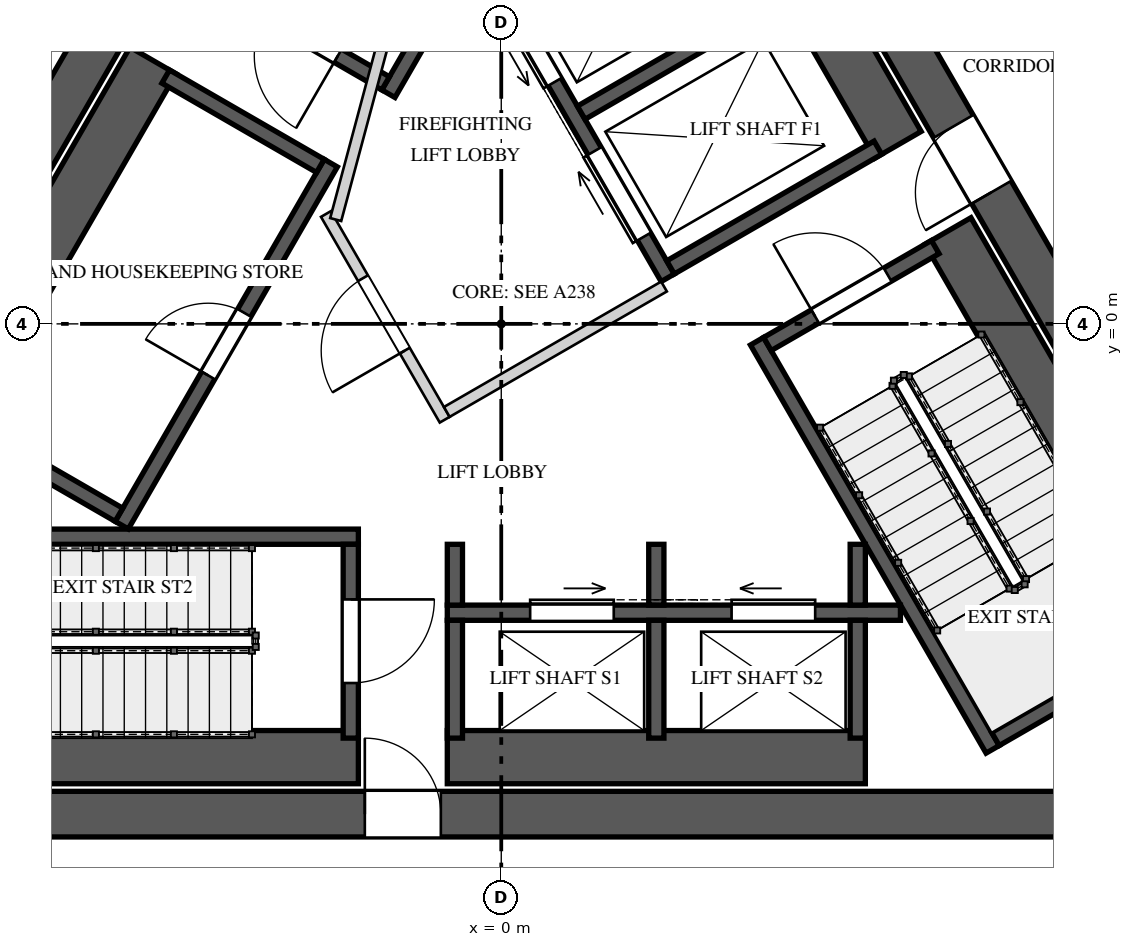
"""IFC4 building model, lengths in metres.
Left out: names, types, materials, properties, quantities, classifications, styles, units other than length and angle.
Written with IfcOpenShell. Run it as: python <this file> out.ifc"""

import sys

from ifc_helpers import new_model, si_unit, direction, frame, frame_2d, origin, place, context, subcontext, project, spatial, rectangle, extrude, element, fill, save


model = new_model("IFC4")
c1 = context("Model", 3, precision=1e-05, world=origin(), true_north=direction((0.0, 1.0)))
c2 = subcontext(c1, "Body", "Model", "MODEL_VIEW")
j1 = project(units=[si_unit("LENGTHUNIT", "METRE"), si_unit("PLANEANGLEUNIT", "RADIAN")], contexts=[c1])
p1 = place(None, origin())
s1 = spatial("IfcSite", under=j1, at=p1, CompositionType="ELEMENT")
p2 = place(p1, origin())
s2 = spatial("IfcBuilding", under=s1, at=p2, CompositionType="ELEMENT")
p3 = place(p2, frame((0.0, 0.0, 274.4)))
s3 = spatial("IfcBuildingStorey", under=s2, at=p3, CompositionType="ELEMENT", Elevation=274.4)
p4 = place(p3, frame((-1.27, 10.7, 0.0), z_axis=(0.0, 0.0, 1.0), x_axis=(-0.499999536116, -0.866025671608, 0.0)))
e1 = element("IfcWall", 1, at=p4, inside=s3, PredefinedType="SHEAR", context=c2, shape_type="SweptSolid", body=[
    extrude(rectangle(XDim=17.263, YDim=0.6, at=frame_2d((8.631, 0.0))), origin(), (0.0, 0.0, 1.0), 4.0),
])
p5 = place(p4, frame((6.836, 0.0, 0.0)))
e2 = element("IfcOpeningElement", 2, at=p5, cuts=e1, PredefinedType="OPENING", context=c2, shape_type="SweptSolid", body=[
    extrude(rectangle(XDim=1.0, YDim=2.4, at=frame_2d((0.5, 1.2))), frame((0.0, 0.31, 0.0), z_axis=(0.0, -1.0, 0.0), x_axis=(1.0, 0.0, 0.0)), (0.0, 0.0, 1.0), 0.62),
])
p6 = place(p4, frame((15.034, 0.0, 0.0)))
e3 = element("IfcOpeningElement", 3, at=p6, cuts=e1, PredefinedType="OPENING", context=c2, shape_type="SweptSolid", body=[
    extrude(rectangle(XDim=0.8, YDim=2.1, at=frame_2d((0.4, 1.05))), frame((0.0, 0.31, 0.0), z_axis=(0.0, -1.0, 0.0), x_axis=(1.0, 0.0, 0.0)), (0.0, 0.0, 1.0), 0.62),
])
p7 = place(p3, frame((-8.631, -6.45, 0.0), z_axis=(0.0, 0.0, 1.0), x_axis=(1.0, 0.0, 0.0)))
e4 = element("IfcWall", 4, at=p7, inside=s3, PredefinedType="SHEAR", context=c2, shape_type="SweptSolid", body=[
    extrude(rectangle(XDim=17.263, YDim=0.6, at=frame_2d((8.631, 0.0))), origin(), (0.0, 0.0, 1.0), 4.0),
])
p8 = place(p7, frame((6.836, 0.0, 0.0)))
e5 = element("IfcOpeningElement", 5, at=p8, cuts=e4, PredefinedType="OPENING", context=c2, shape_type="SweptSolid", body=[
    extrude(rectangle(XDim=1.0, YDim=2.4, at=frame_2d((0.5, 1.2))), frame((0.0, 0.31, 0.0), z_axis=(0.0, -1.0, 0.0), x_axis=(1.0, 0.0, 0.0)), (0.0, 0.0, 1.0), 0.62),
])
p9 = place(p3, frame((9.902, -4.25, 0.0), z_axis=(0.0, 0.0, 1.0), x_axis=(-0.499999536116, 0.866025671608, 0.0)))
e6 = element("IfcWall", 6, at=p9, inside=s3, PredefinedType="SHEAR", context=c2, shape_type="SweptSolid", body=[
    extrude(rectangle(XDim=17.263, YDim=0.6, at=frame_2d((8.631, 0.0))), origin(), (0.0, 0.0, 1.0), 4.0),
])
p10 = place(p9, frame((6.906, 0.0, 0.0)))
e7 = element("IfcOpeningElement", 7, at=p10, cuts=e6, PredefinedType="OPENING", context=c2, shape_type="SweptSolid", body=[
    extrude(rectangle(XDim=1.0, YDim=2.4, at=frame_2d((0.5, 1.2))), frame((0.0, 0.31, 0.0), z_axis=(0.0, -1.0, 0.0), x_axis=(1.0, 0.0, 0.0)), (0.0, 0.0, 1.0), 0.62),
])
p11 = place(p3, frame((1.615, 8.397, 0.0), z_axis=(0.0, 0.0, 1.0), x_axis=(-0.500009909098, -0.866019682689, 0.0)))
e8 = element("IfcWall", 8, at=p11, inside=s3, PredefinedType="SOLIDWALL", context=c2, shape_type="SweptSolid", body=[
    extrude(rectangle(XDim=6.2, YDim=0.2, at=frame_2d((3.1, 0.0))), origin(), (0.0, 0.0, 1.0), 3.65),
])
p12 = place(p3, frame((-1.521, 3.165, 0.0), z_axis=(0.0, 0.0, 1.0), x_axis=(-0.866030925526, 0.499990435942, 0.0)))
e9 = element("IfcWall", 9, at=p12, inside=s3, PredefinedType="SOLIDWALL", context=c2, shape_type="SweptSolid", body=[
    extrude(rectangle(XDim=2.55, YDim=0.2, at=frame_2d((1.275, 0.0))), origin(), (0.0, 0.0, 1.0), 3.65),
])
p13 = place(p12, frame((0.725, 0.0, 0.0)))
e10 = element("IfcOpeningElement", 10, at=p13, cuts=e9, PredefinedType="OPENING", context=c2, shape_type="SweptSolid", body=[
    extrude(rectangle(XDim=1.1, YDim=2.4, at=frame_2d((0.55, 1.2))), frame((0.0, 0.11, 0.0), z_axis=(0.0, -1.0, 0.0), x_axis=(1.0, 0.0, 0.0)), (0.0, 0.0, 1.0), 0.22),
])
p14 = place(p3, frame((-8.08, -5.7, 0.0), z_axis=(0.0, 0.0, 1.0), x_axis=(1.0, 0.0, 0.0)))
e11 = element("IfcWall", 11, at=p14, inside=s3, PredefinedType="SOLIDWALL", context=c2, shape_type="SweptSolid", body=[
    extrude(rectangle(XDim=6.2, YDim=0.7, at=frame_2d((3.1, 0.0))), origin(), (0.0, 0.0, 1.0), 3.65),
])
p15 = place(p3, frame((-8.08, -2.8, 0.0), z_axis=(0.0, 0.0, 1.0), x_axis=(1.0, 0.0, 0.0)))
e12 = element("IfcWall", 12, at=p15, inside=s3, PredefinedType="SOLIDWALL", context=c2, shape_type="SweptSolid", body=[
    extrude(rectangle(XDim=6.2, YDim=0.2, at=frame_2d((3.1, 0.0))), origin(), (0.0, 0.0, 1.0), 3.65),
])
p16 = place(p3, frame((-1.98, -2.9, 0.0), z_axis=(0.0, 0.0, 1.0), x_axis=(0.0, -1.0, 0.0)))
e13 = element("IfcWall", 13, at=p16, inside=s3, PredefinedType="SOLIDWALL", context=c2, shape_type="SweptSolid", body=[
    extrude(rectangle(XDim=2.55, YDim=0.2, at=frame_2d((1.275, 0.0))), origin(), (0.0, 0.0, 1.0), 3.65),
])
p17 = place(p16, frame((0.725, 0.0, 0.0)))
e14 = element("IfcOpeningElement", 14, at=p17, cuts=e13, PredefinedType="OPENING", context=c2, shape_type="SweptSolid", body=[
    extrude(rectangle(XDim=1.1, YDim=2.4, at=frame_2d((0.55, 1.2))), frame((0.0, 0.11, 0.0), z_axis=(0.0, -1.0, 0.0), x_axis=(1.0, 0.0, 0.0)), (0.0, 0.0, 1.0), 0.22),
])
p18 = place(p3, frame((8.976, -4.147, 0.0), z_axis=(0.0, 0.0, 1.0), x_axis=(-0.49998037582, 0.866036733513, 0.0)))
e15 = element("IfcWall", 15, at=p18, inside=s3, PredefinedType="SOLIDWALL", context=c2, shape_type="SweptSolid", body=[
    extrude(rectangle(XDim=6.2, YDim=0.7, at=frame_2d((3.1, 0.0))), origin(), (0.0, 0.0, 1.0), 3.65),
])
p19 = place(p3, frame((6.465, -5.597, 0.0), z_axis=(0.0, 0.0, 1.0), x_axis=(-0.49998037582, 0.866036733513, 0.0)))
e16 = element("IfcWall", 16, at=p19, inside=s3, PredefinedType="SOLIDWALL", context=c2, shape_type="SweptSolid", body=[
    extrude(rectangle(XDim=6.2, YDim=0.2, at=frame_2d((3.1, 0.0))), origin(), (0.0, 0.0, 1.0), 3.65),
])
p20 = place(p3, frame((6.501, -5.461, 0.0), z_axis=(0.0, 0.0, 1.0), x_axis=(0.865989465428, 0.500062241894, 0.0)))
e17 = element("IfcWall", 17, at=p20, inside=s3, PredefinedType="SOLIDWALL", context=c2, shape_type="SweptSolid", body=[
    extrude(rectangle(XDim=2.55, YDim=0.2, at=frame_2d((1.275, 0.0))), origin(), (0.0, 0.0, 1.0), 3.65),
])
p21 = place(p3, frame((3.501, -0.265, 0.0), z_axis=(0.0, 0.0, 1.0), x_axis=(0.866030925526, 0.499990435942, 0.0)))
e18 = element("IfcWall", 18, at=p21, inside=s3, PredefinedType="SOLIDWALL", context=c2, shape_type="SweptSolid", body=[
    extrude(rectangle(XDim=2.55, YDim=0.2, at=frame_2d((1.275, 0.0))), origin(), (0.0, 0.0, 1.0), 3.65),
])
p22 = place(p21, frame((0.725, 0.0, 0.0)))
e19 = element("IfcOpeningElement", 19, at=p22, cuts=e18, PredefinedType="OPENING", context=c2, shape_type="SweptSolid", body=[
    extrude(rectangle(XDim=1.1, YDim=2.4, at=frame_2d((0.55, 1.2))), frame((0.0, 0.11, 0.0), z_axis=(0.0, -1.0, 0.0), x_axis=(1.0, 0.0, 0.0)), (0.0, 0.0, 1.0), 0.22),
])
p23 = place(p3, frame((-4.993, -2.648, 0.0), z_axis=(0.0, 0.0, 1.0), x_axis=(0.499996545922, 0.866027397988, 0.0)))
e20 = element("IfcWall", 20, at=p23, inside=s3, PredefinedType="SOLIDWALL", context=c2, shape_type="SweptSolid", body=[
    extrude(rectangle(XDim=5.5, YDim=0.2, at=frame_2d((2.75, 0.0))), origin(), (0.0, 0.0, 1.0), 3.65),
])
p24 = place(p23, frame((2.275, 0.0, 0.0)))
e21 = element("IfcOpeningElement", 21, at=p24, cuts=e20, PredefinedType="OPENING", context=c2, shape_type="SweptSolid", body=[
    extrude(rectangle(XDim=0.95, YDim=2.4, at=frame_2d((0.475, 1.2))), frame((0.0, 0.11, 0.0), z_axis=(0.0, -1.0, 0.0), x_axis=(1.0, 0.0, 0.0)), (0.0, 0.0, 1.0), 0.22),
])
p25 = place(p3, frame((-4.581, 3.465, 0.0), z_axis=(0.0, 0.0, 1.0), x_axis=(-0.499996545922, -0.866027397988, 0.0)))
e22 = element("IfcWall", 22, at=p25, inside=s3, PredefinedType="SOLIDWALL", context=c2, shape_type="SweptSolid", body=[
    extrude(rectangle(XDim=5.5, YDim=0.7, at=frame_2d((2.75, 0.0))), origin(), (0.0, 0.0, 1.0), 3.65),
])
p26 = place(p3, frame((-2.38, 2.078, 0.0), z_axis=(0.0, 0.0, 1.0), x_axis=(-0.866061024631, 0.499938297808, 0.0)))
e23 = element("IfcWall", 23, at=p26, inside=s3, PredefinedType="SOLIDWALL", context=c2, shape_type="SweptSolid", body=[
    extrude(rectangle(XDim=2.35, YDim=0.2, at=frame_2d((1.175, 0.0))), origin(), (0.0, 0.0, 1.0), 3.65),
])
p27 = place(p3, frame((-5.03, -2.512, 0.0), z_axis=(0.0, 0.0, 1.0), x_axis=(-0.866016039709, 0.500016218704, 0.0)))
e24 = element("IfcWall", 24, at=p27, inside=s3, PredefinedType="SOLIDWALL", context=c2, shape_type="SweptSolid", body=[
    extrude(rectangle(XDim=2.35, YDim=0.2, at=frame_2d((1.175, 0.0))), origin(), (0.0, 0.0, 1.0), 3.65),
])
p28 = place(p3, frame((-0.71, -3.8, 0.0), z_axis=(0.0, 0.0, 1.0), x_axis=(1.0, 0.0, 0.0)))
e25 = element("IfcWall", 25, at=p28, inside=s3, PredefinedType="SOLIDWALL", context=c2, shape_type="SweptSolid", body=[
    extrude(rectangle(XDim=5.961, YDim=0.2, at=frame_2d((2.981, 0.0))), origin(), (0.0, 0.0, 1.0), 3.65),
])
p29 = place(p28, frame((1.09, 0.0, 0.0)))
e26 = element("IfcOpeningElement", 26, at=p29, cuts=e25, PredefinedType="OPENING", context=c2, shape_type="SweptSolid", body=[
    extrude(rectangle(XDim=1.1, YDim=2.1, at=frame_2d((0.55, 1.05))), frame((0.0, 0.11, 0.0), z_axis=(0.0, -1.0, 0.0), x_axis=(1.0, 0.0, 0.0)), (0.0, 0.0, 1.0), 0.22),
])
p30 = place(p28, frame((3.74, 0.0, 0.0)))
e27 = element("IfcOpeningElement", 27, at=p30, cuts=e25, PredefinedType="OPENING", context=c2, shape_type="SweptSolid", body=[
    extrude(rectangle(XDim=1.1, YDim=2.1, at=frame_2d((0.55, 1.05))), frame((0.0, 0.11, 0.0), z_axis=(0.0, -1.0, 0.0), x_axis=(1.0, 0.0, 0.0)), (0.0, 0.0, 1.0), 0.22),
])
p31 = place(p3, frame((-0.71, -5.7, 0.0), z_axis=(0.0, 0.0, 1.0), x_axis=(1.0, 0.0, 0.0)))
e28 = element("IfcWall", 28, at=p31, inside=s3, PredefinedType="SOLIDWALL", context=c2, shape_type="SweptSolid", body=[
    extrude(rectangle(XDim=5.5, YDim=0.7, at=frame_2d((2.75, 0.0))), origin(), (0.0, 0.0, 1.0), 3.65),
])
p32 = place(p3, frame((-0.61, -3.9, 0.0), z_axis=(0.0, 0.0, 1.0), x_axis=(0.0, -1.0, 0.0)))
e29 = element("IfcWall", 29, at=p32, inside=s3, PredefinedType="SOLIDWALL", context=c2, shape_type="SweptSolid", body=[
    extrude(rectangle(XDim=1.55, YDim=0.2, at=frame_2d((0.775, 0.0))), origin(), (0.0, 0.0, 1.0), 3.65),
])
p33 = place(p3, frame((-0.61, -2.9, 0.0), z_axis=(0.0, 0.0, 1.0), x_axis=(0.0, -1.0, 0.0)))
e30 = element("IfcWall", 30, at=p33, inside=s3, PredefinedType="SOLIDWALL", context=c2, shape_type="SweptSolid", body=[
    extrude(rectangle(XDim=0.8, YDim=0.2, at=frame_2d((0.4, 0.0))), origin(), (0.0, 0.0, 1.0), 3.65),
])
p34 = place(p3, frame((2.04, -3.9, 0.0), z_axis=(0.0, 0.0, 1.0), x_axis=(0.0, -1.0, 0.0)))
e31 = element("IfcWall", 31, at=p34, inside=s3, PredefinedType="SOLIDWALL", context=c2, shape_type="SweptSolid", body=[
    extrude(rectangle(XDim=1.55, YDim=0.2, at=frame_2d((0.775, 0.0))), origin(), (0.0, 0.0, 1.0), 3.65),
])
p35 = place(p3, frame((2.04, -2.9, 0.0), z_axis=(0.0, 0.0, 1.0), x_axis=(0.0, -1.0, 0.0)))
e32 = element("IfcWall", 32, at=p35, inside=s3, PredefinedType="SOLIDWALL", context=c2, shape_type="SweptSolid", body=[
    extrude(rectangle(XDim=0.8, YDim=0.2, at=frame_2d((0.4, 0.0))), origin(), (0.0, 0.0, 1.0), 3.65),
])
p36 = place(p3, frame((4.69, -3.9, 0.0), z_axis=(0.0, 0.0, 1.0), x_axis=(0.0, -1.0, 0.0)))
e33 = element("IfcWall", 33, at=p36, inside=s3, PredefinedType="SOLIDWALL", context=c2, shape_type="SweptSolid", body=[
    extrude(rectangle(XDim=1.55, YDim=0.2, at=frame_2d((0.775, 0.0))), origin(), (0.0, 0.0, 1.0), 3.65),
])
p37 = place(p3, frame((4.69, -2.9, 0.0), z_axis=(0.0, 0.0, 1.0), x_axis=(0.0, -1.0, 0.0)))
e34 = element("IfcWall", 34, at=p37, inside=s3, PredefinedType="SOLIDWALL", context=c2, shape_type="SweptSolid", body=[
    extrude(rectangle(XDim=0.8, YDim=0.2, at=frame_2d((0.4, 0.0))), origin(), (0.0, 0.0, 1.0), 3.65),
])
p38 = place(p3, frame((2.19, 0.606, 0.0), z_axis=(0.0, 0.0, 1.0), x_axis=(-0.500002801628, 0.866023786258, 0.0)))
e35 = element("IfcWall", 35, at=p38, inside=s3, PredefinedType="SOLIDWALL", context=c2, shape_type="SweptSolid", body=[
    extrude(rectangle(XDim=4.9, YDim=0.2, at=frame_2d((2.45, 0.0))), origin(), (0.0, 0.0, 1.0), 3.65),
])
p39 = place(p38, frame((0.625, 0.0, 0.0)))
e36 = element("IfcOpeningElement", 36, at=p39, cuts=e35, PredefinedType="OPENING", context=c2, shape_type="SweptSolid", body=[
    extrude(rectangle(XDim=1.3, YDim=2.1, at=frame_2d((0.65, 1.05))), frame((0.0, 0.11, 0.0), z_axis=(0.0, -1.0, 0.0), x_axis=(1.0, 0.0, 0.0)), (0.0, 0.0, 1.0), 0.22),
])
p40 = place(p38, frame((2.975, 0.0, 0.0)))
e37 = element("IfcOpeningElement", 37, at=p40, cuts=e35, PredefinedType="OPENING", context=c2, shape_type="SweptSolid", body=[
    extrude(rectangle(XDim=1.3, YDim=2.1, at=frame_2d((0.65, 1.05))), frame((0.0, 0.11, 0.0), z_axis=(0.0, -1.0, 0.0), x_axis=(1.0, 0.0, 0.0)), (0.0, 0.0, 1.0), 0.22),
])
p41 = place(p3, frame((5.221, 2.356, 0.0), z_axis=(0.0, 0.0, 1.0), x_axis=(-0.500040169509, 0.866002210665, 0.0)))
e38 = element("IfcWall", 38, at=p41, inside=s3, PredefinedType="SOLIDWALL", context=c2, shape_type="SweptSolid", body=[
    extrude(rectangle(XDim=4.9, YDim=0.7, at=frame_2d((2.45, 0.0))), origin(), (0.0, 0.0, 1.0), 3.65),
])
for number, where, z_axis, x_axis in (
    (39, (2.227, 0.743, 0.0), (0.0, 0.0, 1.0), (0.866, 0.5, 0.0)),
    (40, (1.052, 2.778, 0.0), (0.0, 0.0, 1.0), (0.866, 0.5, 0.0)),
):
    element("IfcWall", number, at=place(p3, frame(where, z_axis=z_axis, x_axis=x_axis)), inside=s3, PredefinedType="SOLIDWALL", context=c2, shape_type="SweptSolid", body=[
        extrude(rectangle(XDim=3.15, YDim=0.2, at=frame_2d((1.575, 0.0))), origin(), (0.0, 0.0, 1.0), 3.65),
    ])
p42 = place(p3, frame((-0.744, -1.261, 0.0), z_axis=(0.0, 0.0, 1.0), x_axis=(-0.500004234368, 0.866022959057, 0.0)))
e41 = element("IfcWall", 41, at=p42, inside=s3, PredefinedType="PARTITIONING", context=c2, shape_type="SweptSolid", body=[
    extrude(rectangle(XDim=3.125, YDim=0.15, at=frame_2d((1.562, 0.0))), origin(), (0.0, 0.0, 1.0), 3.65),
])
p43 = place(p42, frame((1.05, 0.0, 0.0)))
e42 = element("IfcOpeningElement", 42, at=p43, cuts=e41, PredefinedType="OPENING", context=c2, shape_type="SweptSolid", body=[
    extrude(rectangle(XDim=1.1, YDim=2.4, at=frame_2d((0.55, 1.2))), frame((0.0, 0.085, 0.0), z_axis=(0.0, -1.0, 0.0), x_axis=(1.0, 0.0, 0.0)), (0.0, 0.0, 1.0), 0.17),
])
p44 = place(p3, frame((-0.717, -1.159, 0.0), z_axis=(0.0, 0.0, 1.0), x_axis=(0.866008176907, 0.50002983664, 0.0)))
e43 = element("IfcWall", 43, at=p44, inside=s3, PredefinedType="PARTITIONING", context=c2, shape_type="SweptSolid", body=[
    extrude(rectangle(XDim=3.3, YDim=0.15, at=frame_2d((1.65, 0.0))), origin(), (0.0, 0.0, 1.0), 3.65),
])
p45 = place(p3, frame((-2.178, 1.372, 0.0), z_axis=(0.0, 0.0, 1.0), x_axis=(0.258808958833, 0.96592852884, 0.0)))
e44 = element("IfcWall", 44, at=p45, inside=s3, PredefinedType="PARTITIONING", context=c2, shape_type="SweptSolid", body=[
    extrude(rectangle(XDim=2.903, YDim=0.15, at=frame_2d((1.451, 0.0))), origin(), (0.0, 0.0, 1.0), 3.65),
])
p46 = place(p13, origin())
e45 = element("IfcDoor", 45, at=p46, inside=s3, OperationType="SINGLE_SWING_RIGHT", PredefinedType="DOOR", context=c2, shape_type="SweptSolid", body=[
    extrude(rectangle(XDim=1.1, YDim=2.4, at=frame_2d((0.55, 1.2))), frame((0.0, 0.025, 0.0), z_axis=(0.0, -1.0, 0.0), x_axis=(1.0, 0.0, 0.0)), (0.0, 0.0, 1.0), 0.05),
])
fill(e10, e45)
p47 = place(p17, origin())
e46 = element("IfcDoor", 46, at=p47, inside=s3, OperationType="SINGLE_SWING_LEFT", PredefinedType="DOOR", context=c2, shape_type="SweptSolid", body=[
    extrude(rectangle(XDim=1.1, YDim=2.4, at=frame_2d((0.55, 1.2))), frame((0.0, 0.025, 0.0), z_axis=(0.0, -1.0, 0.0), x_axis=(1.0, 0.0, 0.0)), (0.0, 0.0, 1.0), 0.05),
])
fill(e14, e46)
p48 = place(p22, origin())
e47 = element("IfcDoor", 47, at=p48, inside=s3, OperationType="SINGLE_SWING_RIGHT", PredefinedType="DOOR", context=c2, shape_type="SweptSolid", body=[
    extrude(rectangle(XDim=1.1, YDim=2.4, at=frame_2d((0.55, 1.2))), frame((0.0, 0.025, 0.0), z_axis=(0.0, -1.0, 0.0), x_axis=(1.0, 0.0, 0.0)), (0.0, 0.0, 1.0), 0.05),
])
fill(e19, e47)
p49 = place(p24, origin())
e48 = element("IfcDoor", 48, at=p49, inside=s3, OperationType="SINGLE_SWING_LEFT", PredefinedType="DOOR", context=c2, shape_type="SweptSolid", body=[
    extrude(rectangle(XDim=0.95, YDim=2.4, at=frame_2d((0.475, 1.2))), frame((0.0, 0.025, 0.0), z_axis=(0.0, -1.0, 0.0), x_axis=(1.0, 0.0, 0.0)), (0.0, 0.0, 1.0), 0.05),
])
fill(e21, e48)
p50 = place(p29, origin())
e49 = element("IfcDoor", 49, at=p50, inside=s3, OperationType="SLIDING_TO_RIGHT", PredefinedType="DOOR", context=c2, shape_type="SweptSolid", body=[
    extrude(rectangle(XDim=1.1, YDim=2.1, at=frame_2d((0.55, 1.05))), frame((0.0, 0.025, 0.0), z_axis=(0.0, -1.0, 0.0), x_axis=(1.0, 0.0, 0.0)), (0.0, 0.0, 1.0), 0.05),
])
fill(e26, e49)
p51 = place(p30, origin())
e50 = element("IfcDoor", 50, at=p51, inside=s3, OperationType="SLIDING_TO_LEFT", PredefinedType="DOOR", context=c2, shape_type="SweptSolid", body=[
    extrude(rectangle(XDim=1.1, YDim=2.1, at=frame_2d((0.55, 1.05))), frame((0.0, 0.025, 0.0), z_axis=(0.0, -1.0, 0.0), x_axis=(1.0, 0.0, 0.0)), (0.0, 0.0, 1.0), 0.05),
])
fill(e27, e50)
p52 = place(p39, origin())
e51 = element("IfcDoor", 51, at=p52, inside=s3, OperationType="SLIDING_TO_RIGHT", PredefinedType="DOOR", context=c2, shape_type="SweptSolid", body=[
    extrude(rectangle(XDim=1.3, YDim=2.1, at=frame_2d((0.65, 1.05))), frame((0.0, 0.025, 0.0), z_axis=(0.0, -1.0, 0.0), x_axis=(1.0, 0.0, 0.0)), (0.0, 0.0, 1.0), 0.05),
])
fill(e36, e51)
p53 = place(p40, origin())
e52 = element("IfcDoor", 52, at=p53, inside=s3, OperationType="SLIDING_TO_LEFT", PredefinedType="DOOR", context=c2, shape_type="SweptSolid", body=[
    extrude(rectangle(XDim=1.3, YDim=2.1, at=frame_2d((0.65, 1.05))), frame((0.0, 0.025, 0.0), z_axis=(0.0, -1.0, 0.0), x_axis=(1.0, 0.0, 0.0)), (0.0, 0.0, 1.0), 0.05),
])
fill(e37, e52)
p54 = place(p43, origin())
e53 = element("IfcDoor", 53, at=p54, inside=s3, OperationType="SINGLE_SWING_RIGHT", PredefinedType="DOOR", context=c2, shape_type="SweptSolid", body=[
    extrude(rectangle(XDim=1.1, YDim=2.4, at=frame_2d((0.55, 1.2))), frame((0.0, 0.025, 0.0), z_axis=(0.0, -1.0, 0.0), x_axis=(1.0, 0.0, 0.0)), (0.0, 0.0, 1.0), 0.05),
])
fill(e42, e53)
p55 = place(p8, origin())
e54 = element("IfcDoor", 54, at=p55, inside=s3, OperationType="SINGLE_SWING_RIGHT", PredefinedType="DOOR", context=c2, shape_type="SweptSolid", body=[
    extrude(rectangle(XDim=1.0, YDim=2.4, at=frame_2d((0.5, 1.2))), frame((0.0, 0.025, 0.0), z_axis=(0.0, -1.0, 0.0), x_axis=(1.0, 0.0, 0.0)), (0.0, 0.0, 1.0), 0.05),
])
fill(e5, e54)
p56 = place(p10, origin())
e55 = element("IfcDoor", 55, at=p56, inside=s3, OperationType="SINGLE_SWING_LEFT", PredefinedType="DOOR", context=c2, shape_type="SweptSolid", body=[
    extrude(rectangle(XDim=1.0, YDim=2.4, at=frame_2d((0.5, 1.2))), frame((0.0, 0.025, 0.0), z_axis=(0.0, -1.0, 0.0), x_axis=(1.0, 0.0, 0.0)), (0.0, 0.0, 1.0), 0.05),
])
fill(e7, e55)
save(model, sys.argv[1])
